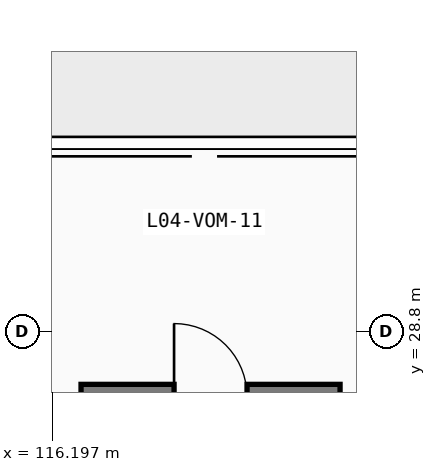
"""IFC4 building model, lengths in metres.
Left out: names, types, materials, properties, quantities, classifications, styles, units other than length and angle.
Written with IfcOpenShell. Run it as: python <this file> out.ifc"""

import sys

from ifc_helpers import new_model, si_unit, direction, frame, frame_2d, origin, place, context, subcontext, project, spatial, rectangle, extrude, element, save


model = new_model("IFC4")
c1 = context("Model", 3, precision=1e-05, world=origin(), true_north=direction((0.0, 1.0)))
c2 = subcontext(c1, "Body", "Model", "MODEL_VIEW")
j1 = project(units=[si_unit("LENGTHUNIT", "METRE"), si_unit("PLANEANGLEUNIT", "RADIAN")], contexts=[c1])
p1 = place(None, origin())
s1 = spatial("IfcSite", under=j1, at=p1, CompositionType="ELEMENT")
p2 = place(p1, origin())
s2 = spatial("IfcBuilding", under=s1, at=p2, CompositionType="ELEMENT")
p3 = place(p2, frame((0.0, 0.0, 18.6)))
s3 = spatial("IfcBuildingStorey", under=s2, at=p3, CompositionType="ELEMENT", Elevation=18.6)
p4 = place(p3, frame((120.93, 27.73, 0.0), z_axis=(0.0, 0.0, 1.0), x_axis=(-1.0, 0.0, 0.0)))
e1 = element("IfcWall", 1, at=p4, inside=s3, PredefinedType="SHEAR", context=c2, shape_type="SweptSolid", body=[
    extrude(rectangle(XDim=4.26, YDim=0.4, at=frame_2d((2.13, 0.0))), origin(), (0.0, 0.0, 1.0), 4.24),
])
p5 = place(p4, frame((2.73, 0.0, 0.0), z_axis=(0.0, 0.0, 1.0), x_axis=(-1.0, 0.0, 0.0)))
e2 = element("IfcOpeningElement", 2, at=p5, cuts=e1, PredefinedType="OPENING", context=c2, shape_type="SweptSolid", body=[
    extrude(rectangle(XDim=1.2, YDim=2.2, at=frame_2d((0.6, 1.1))), frame((0.0, 0.21, 0.0), z_axis=(0.0, -1.0, 0.0), x_axis=(1.0, 0.0, 0.0)), (0.0, 0.0, 1.0), 0.42),
])
save(model, sys.argv[1])
